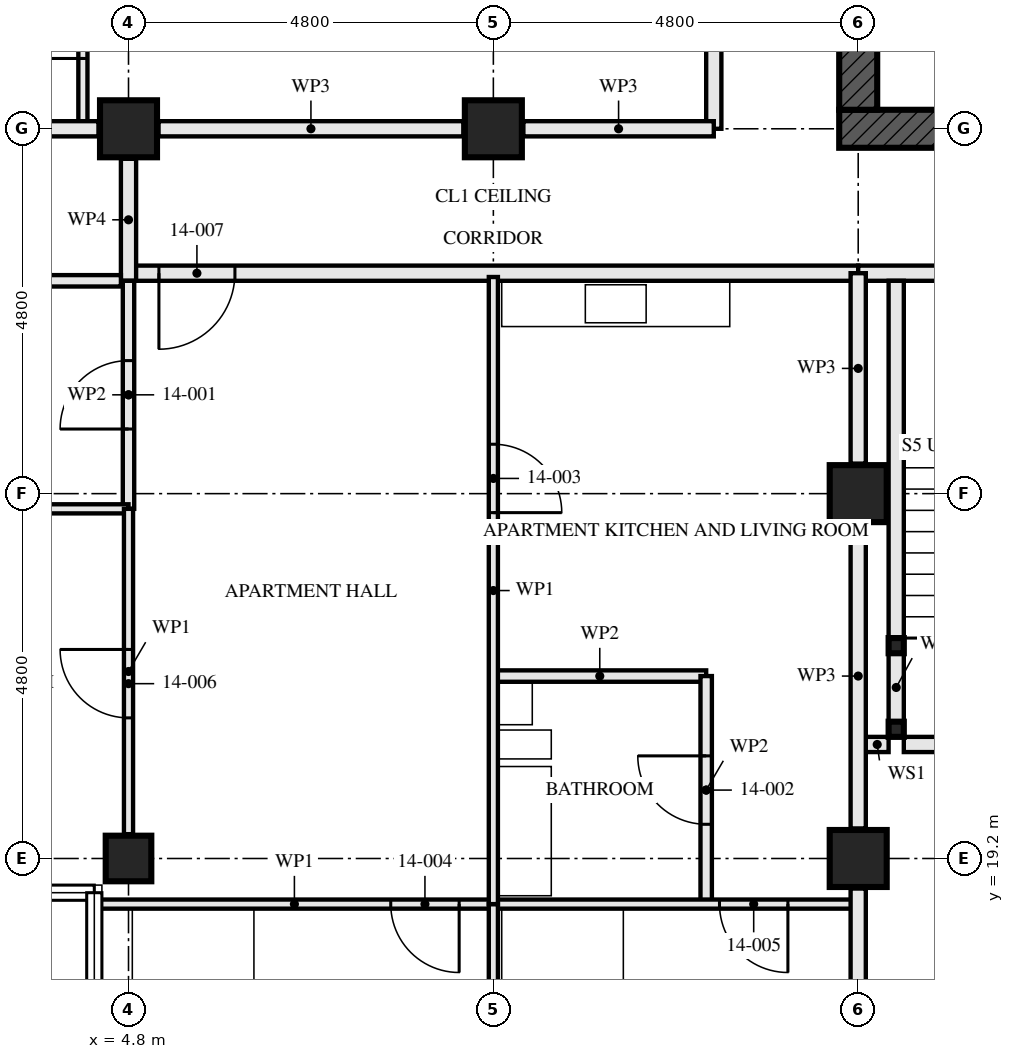
"""IFC4 building model, lengths in metres.
Left out: names, types, materials, properties, quantities, classifications, styles, units other than length and angle.
Written with IfcOpenShell. Run it as: python <this file> out.ifc"""

import sys

from ifc_helpers import new_model, si_unit, direction, frame, frame_2d, origin, origin_2d, place, context, subcontext, project, spatial, rectangle, hollow_rectangle, extrude, element, fill, save


model = new_model("IFC4")
c1 = context("Model", 3, precision=1e-05, world=origin(), true_north=direction((0.0, 1.0)))
c2 = subcontext(c1, "Body", "Model", "MODEL_VIEW")
j1 = project(units=[si_unit("LENGTHUNIT", "METRE"), si_unit("PLANEANGLEUNIT", "RADIAN")], contexts=[c1])
p1 = place(None, origin())
s1 = spatial("IfcSite", under=j1, at=p1, CompositionType="ELEMENT")
p2 = place(p1, origin())
s2 = spatial("IfcBuilding", under=s1, at=p2, CompositionType="ELEMENT")
p3 = place(p2, frame((0.0, 0.0, 55.0)))
s3 = spatial("IfcBuildingStorey", under=s2, at=p3, CompositionType="ELEMENT", Elevation=55.0)
p4 = place(p3, frame((4.8, 19.2, 0.0), z_axis=(0.0, 0.0, 1.0), x_axis=(0.0, 1.0, 0.0)))
e1 = element("IfcColumn", 1, at=p4, inside=s3, PredefinedType="COLUMN", context=c2, shape_type="SweptSolid", body=[
    extrude(hollow_rectangle(XDim=0.6, YDim=0.6, WallThickness=0.05, at=origin_2d()), origin(), (0.0, 0.0, 1.0), 3.5),
])
for number, where, z_axis, x_axis in (
    (2, (4.8, 28.8, 0.0), (0.0, 0.0, 1.0), (0.0, 1.0, 0.0)),
    (3, (9.6, 28.8, 0.0), (0.0, 0.0, 1.0), (0.0, 1.0, 0.0)),
    (4, (14.4, 19.2, 0.0), (0.0, 0.0, 1.0), (1.0, 0.0, 0.0)),
    (5, (14.4, 24.0, 0.0), (0.0, 0.0, 1.0), (1.0, 0.0, 0.0)),
):
    element("IfcColumn", number, at=place(p3, frame(where, z_axis=z_axis, x_axis=x_axis)), inside=s3, PredefinedType="COLUMN", context=c2, shape_type="SweptSolid", body=[
        extrude(hollow_rectangle(XDim=0.75, YDim=0.75, WallThickness=0.08, at=origin_2d()), origin(), (0.0, 0.0, 1.0), 3.5),
    ])
p5 = place(p3, frame((14.15, 28.8, -0.17), z_axis=(0.0, 0.0, 1.0), x_axis=(1.0, 0.0, 0.0)))
e6 = element("IfcWall", 6, at=p5, inside=s3, PredefinedType="SHEAR", context=c2, shape_type="SweptSolid", body=[
    extrude(rectangle(XDim=14.9, YDim=0.5, at=frame_2d((7.45, 0.0))), origin(), (0.0, 0.0, 1.0), 3.5),
])
p6 = place(p5, frame((6.85, 0.0, 0.17)))
e7 = element("IfcOpeningElement", 7, at=p6, cuts=e6, PredefinedType="OPENING", context=c2, shape_type="SweptSolid", body=[
    extrude(rectangle(XDim=1.2, YDim=2.1, at=frame_2d((0.6, 1.05))), frame((0.0, 0.26, 0.0), z_axis=(0.0, -1.0, 0.0), x_axis=(1.0, 0.0, 0.0)), (0.0, 0.0, 1.0), 0.521),
])
p7 = place(p3, frame((14.4, 42.95, -0.17), z_axis=(0.0, 0.0, 1.0), x_axis=(0.0, -1.0, 0.0)))
e8 = element("IfcWall", 8, at=p7, inside=s3, PredefinedType="SHEAR", context=c2, shape_type="SweptSolid", body=[
    extrude(rectangle(XDim=13.9, YDim=0.5, at=frame_2d((6.95, 0.0))), origin(), (0.0, 0.0, 1.0), 3.5),
])
p8 = place(p7, frame((6.35, 0.0, 0.17)))
e9 = element("IfcOpeningElement", 9, at=p8, cuts=e8, PredefinedType="OPENING", context=c2, shape_type="SweptSolid", body=[
    extrude(rectangle(XDim=1.2, YDim=2.1, at=frame_2d((0.6, 1.05))), frame((0.0, 0.26, 0.0), z_axis=(0.0, -1.0, 0.0), x_axis=(1.0, 0.0, 0.0)), (0.0, 0.0, 1.0), 0.521),
])
for number, where, z_axis, x_axis in (
    (10, (14.9, 20.9, 0.0), (0.0, 0.0, 1.0), (1.0, 0.0, 0.0)),
    (11, (14.9, 22.0, 0.0), (0.0, 0.0, 1.0), (1.0, 0.0, 0.0)),
):
    element("IfcColumn", number, at=place(p3, frame(where, z_axis=z_axis, x_axis=x_axis)), inside=s3, PredefinedType="COLUMN", context=c2, shape_type="SweptSolid", body=[
        extrude(hollow_rectangle(XDim=0.2, YDim=0.2, WallThickness=0.008, at=origin_2d()), origin(), (0.0, 0.0, 1.0), 3.33),
    ])
p9 = place(p3, frame((4.8, 23.8, 0.0), z_axis=(0.0, 0.0, 1.0), x_axis=(0.0, 1.0, 0.0)))
e12 = element("IfcWall", 12, at=p9, inside=s3, PredefinedType="PARTITIONING", context=c2, shape_type="SweptSolid", body=[
    extrude(rectangle(XDim=3.0, YDim=0.15, at=frame_2d((1.5, 0.0))), origin(), (0.0, 0.0, 1.0), 2.55),
])
p10 = place(p9, frame((1.05, 0.0, 0.0)))
e13 = element("IfcOpeningElement", 13, at=p10, cuts=e12, PredefinedType="OPENING", context=c2, shape_type="SweptSolid", body=[
    extrude(rectangle(XDim=0.9, YDim=2.1, at=frame_2d((0.45, 1.05))), frame((0.0, 0.085, 0.0), z_axis=(0.0, -1.0, 0.0), x_axis=(1.0, 0.0, 0.0)), (0.0, 0.0, 1.0), 0.171),
])
p11 = place(p3, frame((12.4, 18.6, 0.0), z_axis=(0.0, 0.0, 1.0), x_axis=(0.0, 1.0, 0.0)))
e14 = element("IfcWall", 14, at=p11, inside=s3, PredefinedType="PARTITIONING", context=c2, shape_type="SweptSolid", body=[
    extrude(rectangle(XDim=3.0, YDim=0.15, at=frame_2d((1.5, 0.0))), origin(), (0.0, 0.0, 1.0), 2.55),
])
p12 = place(p11, frame((1.05, 0.0, 0.0)))
e15 = element("IfcOpeningElement", 15, at=p12, cuts=e14, PredefinedType="OPENING", context=c2, shape_type="SweptSolid", body=[
    extrude(rectangle(XDim=0.9, YDim=2.1, at=frame_2d((0.45, 1.05))), frame((0.0, 0.085, 0.0), z_axis=(0.0, -1.0, 0.0), x_axis=(1.0, 0.0, 0.0)), (0.0, 0.0, 1.0), 0.171),
])
p13 = place(p3, frame((9.6, 21.6, 0.0), z_axis=(0.0, 0.0, 1.0), x_axis=(1.0, 0.0, 0.0)))
e16 = element("IfcWall", 16, at=p13, inside=s3, PredefinedType="PARTITIONING", context=c2, shape_type="SweptSolid", body=[
    extrude(rectangle(XDim=2.8, YDim=0.15, at=frame_2d((1.4, 0.0))), origin(), (0.0, 0.0, 1.0), 3.33),
])
p14 = place(p3, frame((9.6, 18.6, 0.0), z_axis=(0.0, 0.0, 1.0), x_axis=(0.0, 1.0, 0.0)))
e17 = element("IfcWall", 17, at=p14, inside=s3, PredefinedType="PARTITIONING", context=c2, shape_type="SweptSolid", body=[
    extrude(rectangle(XDim=8.25, YDim=0.12, at=frame_2d((4.125, 0.0))), origin(), (0.0, 0.0, 1.0), 2.55),
])
p15 = place(p14, frame((5.15, 0.0, 0.0)))
e18 = element("IfcOpeningElement", 18, at=p15, cuts=e17, PredefinedType="OPENING", context=c2, shape_type="SweptSolid", body=[
    extrude(rectangle(XDim=0.9, YDim=2.1, at=frame_2d((0.45, 1.05))), frame((0.0, 0.071, 0.0), z_axis=(0.0, -1.0, 0.0), x_axis=(1.0, 0.0, 0.0)), (0.0, 0.0, 1.0), 0.141),
])
p16 = place(p3, frame((0.244, 23.8, 0.0), z_axis=(0.0, 0.0, 1.0), x_axis=(1.0, 0.0, 0.0)))
e19 = element("IfcWall", 19, at=p16, inside=s3, PredefinedType="PARTITIONING", context=c2, shape_type="SweptSolid", body=[
    extrude(rectangle(XDim=4.556, YDim=0.12, at=frame_2d((2.278, 0.0))), origin(), (0.0, 0.0, 1.0), 3.33),
])
p17 = place(p3, frame((4.365, 18.6, 0.0), z_axis=(0.0, 0.0, 1.0), x_axis=(1.0, 0.0, 0.0)))
e20 = element("IfcWall", 20, at=p17, inside=s3, PredefinedType="PARTITIONING", context=c2, shape_type="SweptSolid", body=[
    extrude(rectangle(XDim=5.235, YDim=0.12, at=frame_2d((2.618, 0.0))), origin(), (0.0, 0.0, 1.0), 2.32),
])
p18 = place(p17, frame((3.885, 0.0, 0.0)))
e21 = element("IfcOpeningElement", 21, at=p18, cuts=e20, PredefinedType="OPENING", context=c2, shape_type="SweptSolid", body=[
    extrude(rectangle(XDim=0.9, YDim=2.1, at=frame_2d((0.45, 1.05))), frame((0.0, 0.071, 0.0), z_axis=(0.0, -1.0, 0.0), x_axis=(1.0, 0.0, 0.0)), (0.0, 0.0, 1.0), 0.141),
])
p19 = place(p3, frame((9.6, 18.6, 0.0), z_axis=(0.0, 0.0, 1.0), x_axis=(1.0, 0.0, 0.0)))
e22 = element("IfcWall", 22, at=p19, inside=s3, PredefinedType="PARTITIONING", context=c2, shape_type="SweptSolid", body=[
    extrude(rectangle(XDim=4.8, YDim=0.12, at=frame_2d((2.4, 0.0))), origin(), (0.0, 0.0, 1.0), 3.33),
])
p20 = place(p19, frame((2.975, 0.0, 0.0)))
e23 = element("IfcOpeningElement", 23, at=p20, cuts=e22, PredefinedType="OPENING", context=c2, shape_type="SweptSolid", body=[
    extrude(rectangle(XDim=0.9, YDim=2.1, at=frame_2d((0.45, 1.05))), frame((0.0, 0.071, 0.0), z_axis=(0.0, -1.0, 0.0), x_axis=(1.0, 0.0, 0.0)), (0.0, 0.0, 1.0), 0.141),
])
p21 = place(p3, frame((4.8, 19.52, 0.0), z_axis=(0.0, 0.0, 1.0), x_axis=(0.0, 1.0, 0.0)))
e24 = element("IfcWall", 24, at=p21, inside=s3, PredefinedType="PARTITIONING", context=c2, shape_type="SweptSolid", body=[
    extrude(rectangle(XDim=4.28, YDim=0.12, at=frame_2d((2.14, 0.0))), origin(), (0.0, 0.0, 1.0), 3.33),
])
p22 = place(p21, frame((1.53, 0.0, 0.0)))
e25 = element("IfcOpeningElement", 25, at=p22, cuts=e24, PredefinedType="OPENING", context=c2, shape_type="SweptSolid", body=[
    extrude(rectangle(XDim=0.9, YDim=2.1, at=frame_2d((0.45, 1.05))), frame((0.0, 0.071, 0.0), z_axis=(0.0, -1.0, 0.0), x_axis=(1.0, 0.0, 0.0)), (0.0, 0.0, 1.0), 0.141),
])
p23 = place(p3, frame((9.6, 14.644, 0.0), z_axis=(0.0, 0.0, 1.0), x_axis=(0.0, 1.0, 0.0)))
e26 = element("IfcWall", 26, at=p23, inside=s3, PredefinedType="PARTITIONING", context=c2, shape_type="SweptSolid", body=[
    extrude(rectangle(XDim=3.956, YDim=0.12, at=frame_2d((1.978, 0.0))), origin(), (0.0, 0.0, 1.0), 3.33),
])
p24 = place(p3, frame((4.8, 26.9, 0.0), z_axis=(0.0, 0.0, 1.0), x_axis=(1.0, 0.0, 0.0)))
e27 = element("IfcWall", 27, at=p24, inside=s3, PredefinedType="PARTITIONING", context=c2, shape_type="SweptSolid", body=[
    extrude(rectangle(XDim=9.6, YDim=0.2, at=frame_2d((4.8, 0.0))), origin(), (0.0, 0.0, 1.0), 3.33),
])
p25 = place(p24, frame((0.4, 0.0, 0.0)))
e28 = element("IfcOpeningElement", 28, at=p25, cuts=e27, PredefinedType="OPENING", context=c2, shape_type="SweptSolid", body=[
    extrude(rectangle(XDim=1.0, YDim=2.1, at=frame_2d((0.5, 1.05))), frame((0.0, 0.111, 0.0), z_axis=(0.0, -1.0, 0.0), x_axis=(1.0, 0.0, 0.0)), (0.0, 0.0, 1.0), 0.221),
])
p26 = place(p3, frame((4.8, 26.8, 0.0), z_axis=(0.0, 0.0, 1.0), x_axis=(0.0, 1.0, 0.0)))
e29 = element("IfcWall", 29, at=p26, inside=s3, PredefinedType="PARTITIONING", context=c2, shape_type="SweptSolid", body=[
    extrude(rectangle(XDim=1.605, YDim=0.2, at=frame_2d((0.802, 0.0))), origin(), (0.0, 0.0, 1.0), 3.33),
])
p27 = place(p3, frame((4.2, 33.6, 0.0), z_axis=(0.0, 0.0, 1.0), x_axis=(0.0, -1.0, 0.0)))
e30 = element("IfcWall", 30, at=p27, inside=s3, PredefinedType="PARTITIONING", context=c2, shape_type="SweptSolid", body=[
    extrude(rectangle(XDim=4.8, YDim=0.12, at=frame_2d((2.4, 0.0))), origin(), (0.0, 0.0, 1.0), 3.33),
])
p28 = place(p27, frame((2.975, 0.0, 0.0)))
e31 = element("IfcOpeningElement", 31, at=p28, cuts=e30, PredefinedType="OPENING", context=c2, shape_type="SweptSolid", body=[
    extrude(rectangle(XDim=0.9, YDim=2.1, at=frame_2d((0.45, 1.05))), frame((0.0, 0.071, 0.0), z_axis=(0.0, -1.0, 0.0), x_axis=(1.0, 0.0, 0.0)), (0.0, 0.0, 1.0), 0.141),
])
p29 = place(p3, frame((12.5, 43.2, 0.0), z_axis=(0.0, 0.0, 1.0), x_axis=(0.0, -1.0, 0.0)))
e32 = element("IfcWall", 32, at=p29, inside=s3, PredefinedType="PARTITIONING", context=c2, shape_type="SweptSolid", body=[
    extrude(rectangle(XDim=14.4, YDim=0.2, at=frame_2d((7.2, 0.0))), origin(), (0.0, 0.0, 1.0), 2.55),
])
p30 = place(p29, frame((1.4, 0.0, 0.0)))
e33 = element("IfcOpeningElement", 33, at=p30, cuts=e32, PredefinedType="OPENING", context=c2, shape_type="SweptSolid", body=[
    extrude(rectangle(XDim=1.0, YDim=2.1, at=frame_2d((0.5, 1.05))), frame((0.0, 0.111, 0.0), z_axis=(0.0, -1.0, 0.0), x_axis=(1.0, 0.0, 0.0)), (0.0, 0.0, 1.0), 0.221),
])
p31 = place(p29, frame((5.2, 0.0, 0.0)))
e34 = element("IfcOpeningElement", 34, at=p31, cuts=e32, PredefinedType="OPENING", context=c2, shape_type="SweptSolid", body=[
    extrude(rectangle(XDim=1.0, YDim=2.1, at=frame_2d((0.5, 1.05))), frame((0.0, 0.111, 0.0), z_axis=(0.0, -1.0, 0.0), x_axis=(1.0, 0.0, 0.0)), (0.0, 0.0, 1.0), 0.221),
])
p32 = place(p29, frame((10.0, 0.0, 0.0)))
e35 = element("IfcOpeningElement", 35, at=p32, cuts=e32, PredefinedType="OPENING", context=c2, shape_type="SweptSolid", body=[
    extrude(rectangle(XDim=1.0, YDim=2.1, at=frame_2d((0.5, 1.05))), frame((0.0, 0.111, 0.0), z_axis=(0.0, -1.0, 0.0), x_axis=(1.0, 0.0, 0.0)), (0.0, 0.0, 1.0), 0.221),
])
p33 = place(p3, frame((14.9, 21.0, 0.0), z_axis=(0.0, 0.0, 1.0), x_axis=(0.0, 1.0, 0.0)))
e36 = element("IfcWall", 36, at=p33, inside=s3, PredefinedType="SOLIDWALL", context=c2, shape_type="SweptSolid", body=[
    extrude(rectangle(XDim=0.9, YDim=0.2, at=frame_2d((0.45, 0.0))), origin(), (0.0, 0.0, 1.0), 2.99),
])
p34 = place(p3, frame((14.9, 22.1, 0.0), z_axis=(0.0, 0.0, 1.0), x_axis=(0.0, 1.0, 0.0)))
e37 = element("IfcWall", 37, at=p34, inside=s3, PredefinedType="SOLIDWALL", context=c2, shape_type="SweptSolid", body=[
    extrude(rectangle(XDim=4.7, YDim=0.2, at=frame_2d((2.35, 0.0))), origin(), (0.0, 0.0, 1.0), 2.99),
])
p35 = place(p3, frame((14.5, 20.7, 0.0), z_axis=(0.0, 0.0, 1.0), x_axis=(1.0, 0.0, 0.0)))
e38 = element("IfcWall", 38, at=p35, inside=s3, PredefinedType="SOLIDWALL", context=c2, shape_type="SweptSolid", body=[
    extrude(rectangle(XDim=0.3, YDim=0.2, at=frame_2d((0.15, 0.0))), origin(), (0.0, 0.0, 1.0), 3.33),
])
p36 = place(p3, frame((15.0, 20.7, 0.0), z_axis=(0.0, 0.0, 1.0), x_axis=(1.0, 0.0, 0.0)))
e39 = element("IfcWall", 39, at=p36, inside=s3, PredefinedType="SOLIDWALL", context=c2, shape_type="SweptSolid", body=[
    extrude(rectangle(XDim=2.6, YDim=0.2, at=frame_2d((1.3, 0.0))), origin(), (0.0, 0.0, 1.0), 3.33),
])
p37 = place(p3, frame((14.4, 26.9, 0.0), z_axis=(0.0, 0.0, 1.0), x_axis=(1.0, 0.0, 0.0)))
e40 = element("IfcWall", 40, at=p37, inside=s3, PredefinedType="PARTITIONING", context=c2, shape_type="SweptSolid", body=[
    extrude(rectangle(XDim=14.4, YDim=0.2, at=frame_2d((7.2, 0.0))), origin(), (0.0, 0.0, 1.0), 2.55),
])
p38 = place(p37, frame((1.4, 0.0, 0.0)))
e41 = element("IfcOpeningElement", 41, at=p38, cuts=e40, PredefinedType="OPENING", context=c2, shape_type="SweptSolid", body=[
    extrude(rectangle(XDim=1.0, YDim=2.1, at=frame_2d((0.5, 1.05))), frame((0.0, 0.111, 0.0), z_axis=(0.0, -1.0, 0.0), x_axis=(1.0, 0.0, 0.0)), (0.0, 0.0, 1.0), 0.221),
])
p39 = place(p37, frame((3.65, 0.0, 0.0)))
e42 = element("IfcOpeningElement", 42, at=p39, cuts=e40, PredefinedType="OPENING", context=c2, shape_type="SweptSolid", body=[
    extrude(rectangle(XDim=0.9, YDim=2.1, at=frame_2d((0.45, 1.05))), frame((0.0, 0.111, 0.0), z_axis=(0.0, -1.0, 0.0), x_axis=(1.0, 0.0, 0.0)), (0.0, 0.0, 1.0), 0.221),
])
p40 = place(p37, frame((5.2, 0.0, 0.0)))
e43 = element("IfcOpeningElement", 43, at=p40, cuts=e40, PredefinedType="OPENING", context=c2, shape_type="SweptSolid", body=[
    extrude(rectangle(XDim=1.0, YDim=2.1, at=frame_2d((0.5, 1.05))), frame((0.0, 0.111, 0.0), z_axis=(0.0, -1.0, 0.0), x_axis=(1.0, 0.0, 0.0)), (0.0, 0.0, 1.0), 0.221),
])
p41 = place(p37, frame((10.0, 0.0, 0.0)))
e44 = element("IfcOpeningElement", 44, at=p41, cuts=e40, PredefinedType="OPENING", context=c2, shape_type="SweptSolid", body=[
    extrude(rectangle(XDim=1.0, YDim=2.1, at=frame_2d((0.5, 1.05))), frame((0.0, 0.111, 0.0), z_axis=(0.0, -1.0, 0.0), x_axis=(1.0, 0.0, 0.0)), (0.0, 0.0, 1.0), 0.221),
])
p42 = place(p3, frame((12.5, 28.8, 0.0), z_axis=(0.0, 0.0, 1.0), x_axis=(-1.0, 0.0, 0.0)))
e45 = element("IfcWall", 45, at=p42, inside=s3, PredefinedType="PARTITIONING", context=c2, shape_type="SweptSolid", body=[
    extrude(rectangle(XDim=2.505, YDim=0.2, at=frame_2d((1.252, 0.0))), origin(), (0.0, 0.0, 1.0), 2.32),
])
p43 = place(p3, frame((9.205, 28.8, 0.0), z_axis=(0.0, 0.0, 1.0), x_axis=(-1.0, 0.0, 0.0)))
e46 = element("IfcWall", 46, at=p43, inside=s3, PredefinedType="PARTITIONING", context=c2, shape_type="SweptSolid", body=[
    extrude(rectangle(XDim=4.01, YDim=0.2, at=frame_2d((2.005, 0.0))), origin(), (0.0, 0.0, 1.0), 2.32),
])
p44 = place(p3, frame((4.405, 28.8, 0.0), z_axis=(0.0, 0.0, 1.0), x_axis=(-1.0, 0.0, 0.0)))
e47 = element("IfcWall", 47, at=p44, inside=s3, PredefinedType="PARTITIONING", context=c2, shape_type="SweptSolid", body=[
    extrude(rectangle(XDim=4.11, YDim=0.2, at=frame_2d((2.055, 0.0))), origin(), (0.0, 0.0, 1.0), 2.32),
])
p45 = place(p3, frame((14.4, 14.644, 0.0), z_axis=(0.0, 0.0, 1.0), x_axis=(0.0, 1.0, 0.0)))
e48 = element("IfcWall", 48, at=p45, inside=s3, PredefinedType="PARTITIONING", context=c2, shape_type="SweptSolid", body=[
    extrude(rectangle(XDim=4.161, YDim=0.2, at=frame_2d((2.081, 0.0))), origin(), (0.0, 0.0, 1.0), 2.32),
])
p46 = place(p3, frame((14.4, 19.595, 0.0), z_axis=(0.0, 0.0, 1.0), x_axis=(0.0, 1.0, 0.0)))
e49 = element("IfcWall", 49, at=p46, inside=s3, PredefinedType="PARTITIONING", context=c2, shape_type="SweptSolid", body=[
    extrude(rectangle(XDim=4.01, YDim=0.2, at=frame_2d((2.005, 0.0))), origin(), (0.0, 0.0, 1.0), 2.32),
])
p47 = place(p3, frame((14.4, 24.395, 0.0), z_axis=(0.0, 0.0, 1.0), x_axis=(0.0, 1.0, 0.0)))
e50 = element("IfcWall", 50, at=p47, inside=s3, PredefinedType="PARTITIONING", context=c2, shape_type="SweptSolid", body=[
    extrude(rectangle(XDim=2.505, YDim=0.2, at=frame_2d((1.252, 0.0))), origin(), (0.0, 0.0, 1.0), 2.32),
])
p48 = place(p3, frame((-0.43, 26.8, 0.0), z_axis=(0.0, 0.0, 1.0), x_axis=(1.0, 0.0, 0.0)))
e51 = element("IfcWall", 51, at=p48, inside=s3, PredefinedType="PARTITIONING", context=c2, shape_type="SweptSolid", body=[
    extrude(rectangle(XDim=5.13, YDim=0.15, at=frame_2d((2.565, 0.0))), origin(), (0.0, 0.0, 1.0), 2.32),
])
p49 = place(p10, origin())
e52 = element("IfcDoor", 52, at=p49, inside=s3, OperationType="SINGLE_SWING_RIGHT", PredefinedType="DOOR", context=c2, shape_type="SweptSolid", body=[
    extrude(rectangle(XDim=0.9, YDim=2.1, at=frame_2d((0.45, 1.05))), frame((0.0, 0.022, 0.0), z_axis=(0.0, -1.0, 0.0), x_axis=(1.0, 0.0, 0.0)), (0.0, 0.0, 1.0), 0.044),
])
fill(e13, e52)
p50 = place(p12, origin())
e53 = element("IfcDoor", 53, at=p50, inside=s3, OperationType="SINGLE_SWING_LEFT", PredefinedType="DOOR", context=c2, shape_type="SweptSolid", body=[
    extrude(rectangle(XDim=0.9, YDim=2.1, at=frame_2d((0.45, 1.05))), frame((0.0, 0.022, 0.0), z_axis=(0.0, -1.0, 0.0), x_axis=(1.0, 0.0, 0.0)), (0.0, 0.0, 1.0), 0.044),
])
fill(e15, e53)
p51 = place(p15, frame((0.9, 0.0, 0.0), z_axis=(0.0, 0.0, 1.0), x_axis=(-1.0, 0.0, 0.0)))
e54 = element("IfcDoor", 54, at=p51, inside=s3, OperationType="SINGLE_SWING_LEFT", PredefinedType="DOOR", context=c2, shape_type="SweptSolid", body=[
    extrude(rectangle(XDim=0.9, YDim=2.1, at=frame_2d((0.45, 1.05))), frame((0.0, 0.022, 0.0), z_axis=(0.0, -1.0, 0.0), x_axis=(1.0, 0.0, 0.0)), (0.0, 0.0, 1.0), 0.044),
])
fill(e18, e54)
p52 = place(p18, frame((0.9, 0.0, 0.0), z_axis=(0.0, 0.0, 1.0), x_axis=(-1.0, 0.0, 0.0)))
e55 = element("IfcDoor", 55, at=p52, inside=s3, OperationType="SINGLE_SWING_RIGHT", PredefinedType="DOOR", context=c2, shape_type="SweptSolid", body=[
    extrude(rectangle(XDim=0.9, YDim=2.1, at=frame_2d((0.45, 1.05))), frame((0.0, 0.022, 0.0), z_axis=(0.0, -1.0, 0.0), x_axis=(1.0, 0.0, 0.0)), (0.0, 0.0, 1.0), 0.044),
])
fill(e21, e55)
p53 = place(p20, frame((0.9, 0.0, 0.0), z_axis=(0.0, 0.0, 1.0), x_axis=(-1.0, 0.0, 0.0)))
e56 = element("IfcDoor", 56, at=p53, inside=s3, OperationType="SINGLE_SWING_RIGHT", PredefinedType="DOOR", context=c2, shape_type="SweptSolid", body=[
    extrude(rectangle(XDim=0.9, YDim=2.1, at=frame_2d((0.45, 1.05))), frame((0.0, 0.022, 0.0), z_axis=(0.0, -1.0, 0.0), x_axis=(1.0, 0.0, 0.0)), (0.0, 0.0, 1.0), 0.044),
])
fill(e23, e56)
p54 = place(p22, origin())
e57 = element("IfcDoor", 57, at=p54, inside=s3, OperationType="SINGLE_SWING_LEFT", PredefinedType="DOOR", context=c2, shape_type="SweptSolid", body=[
    extrude(rectangle(XDim=0.9, YDim=2.1, at=frame_2d((0.45, 1.05))), frame((0.0, 0.022, 0.0), z_axis=(0.0, -1.0, 0.0), x_axis=(1.0, 0.0, 0.0)), (0.0, 0.0, 1.0), 0.044),
])
fill(e25, e57)
p55 = place(p25, frame((1.0, 0.0, 0.0), z_axis=(0.0, 0.0, 1.0), x_axis=(-1.0, 0.0, 0.0)))
e58 = element("IfcDoor", 58, at=p55, inside=s3, OperationType="SINGLE_SWING_LEFT", PredefinedType="DOOR", context=c2, shape_type="SweptSolid", body=[
    extrude(rectangle(XDim=1.0, YDim=2.1, at=frame_2d((0.5, 1.05))), frame((0.0, 0.027, 0.0), z_axis=(0.0, -1.0, 0.0), x_axis=(1.0, 0.0, 0.0)), (0.0, 0.0, 1.0), 0.054),
])
fill(e28, e58)
p56 = place(p28, frame((0.9, 0.0, 0.0), z_axis=(0.0, 0.0, 1.0), x_axis=(-1.0, 0.0, 0.0)))
e59 = element("IfcDoor", 59, at=p56, inside=s3, OperationType="SINGLE_SWING_RIGHT", PredefinedType="DOOR", context=c2, shape_type="SweptSolid", body=[
    extrude(rectangle(XDim=0.9, YDim=2.1, at=frame_2d((0.45, 1.05))), frame((0.0, 0.022, 0.0), z_axis=(0.0, -1.0, 0.0), x_axis=(1.0, 0.0, 0.0)), (0.0, 0.0, 1.0), 0.044),
])
fill(e31, e59)
save(model, sys.argv[1])
